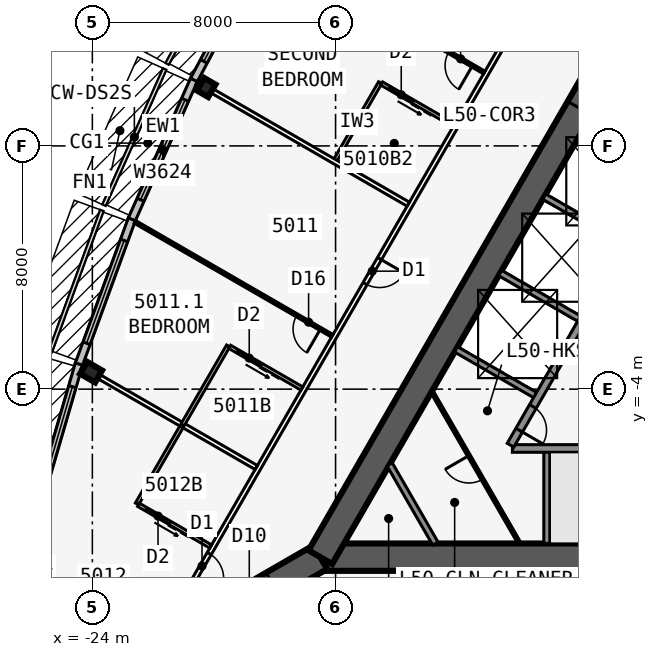
"""IFC4 building model, lengths in metres.
Left out: names, types, materials, properties, quantities, classifications, styles, units other than length and angle.
Written with IfcOpenShell. Run it as: python <this file> out.ifc"""

import sys

from ifc_helpers import new_model, si_unit, direction, frame, frame_2d, origin, origin_2d, place, context, subcontext, project, spatial, rectangle, i_section, extrude, element, fill, save


model = new_model("IFC4")
c1 = context("Model", 3, precision=1e-05, world=origin(), true_north=direction((0.0, 1.0)))
c2 = subcontext(c1, "Body", "Model", "MODEL_VIEW")
j1 = project(units=[si_unit("LENGTHUNIT", "METRE"), si_unit("PLANEANGLEUNIT", "RADIAN")], contexts=[c1])
p1 = place(None, origin())
s1 = spatial("IfcSite", under=j1, at=p1, CompositionType="ELEMENT")
p2 = place(p1, origin())
s2 = spatial("IfcBuilding", under=s1, at=p2, CompositionType="ELEMENT")
p3 = place(p2, frame((0.0, 0.0, 186.1)))
s3 = spatial("IfcBuildingStorey", under=s2, at=p3, CompositionType="ELEMENT", Elevation=186.1)
p4 = place(p3, frame((-16.5, -9.526, 0.0), z_axis=(0.0, 0.0, 1.0), x_axis=(1.0, 0.0, 0.0)))
e1 = element("IfcWall", 1, at=p4, inside=s3, PredefinedType="SHEAR", context=c2, shape_type="SweptSolid", body=[
    extrude(rectangle(XDim=33.0, YDim=0.9, at=frame_2d((16.5, 0.0))), origin(), (0.0, 0.0, 1.0), 3.4),
])
p5 = place(p4, frame((14.05, 0.0, 0.0)))
e2 = element("IfcOpeningElement", 2, at=p5, cuts=e1, PredefinedType="OPENING", context=c2, shape_type="SweptSolid", body=[
    extrude(rectangle(XDim=1.8, YDim=2.13, at=frame_2d((0.9, 1.065))), frame((0.0, 0.46, 0.0), z_axis=(0.0, -1.0, 0.0), x_axis=(1.0, 0.0, 0.0)), (0.0, 0.0, 1.0), 0.92),
])
p6 = place(p3, frame((-10.183, -5.951, 0.0), z_axis=(0.0, 0.0, 1.0), x_axis=(1.0, 0.0, 0.0)))
e3 = element("IfcWall", 3, at=p6, inside=s3, PredefinedType="SOLIDWALL", context=c2, shape_type="SweptSolid", body=[
    extrude(rectangle(XDim=7.633, YDim=0.25, at=frame_2d((3.816, 0.0))), origin(), (0.0, 0.0, 1.0), 3.15),
])
p7 = place(p3, frame((-9.05, -5.951, 0.0), z_axis=(0.0, 0.0, 1.0), x_axis=(0.0, -1.0, 0.0)))
e4 = element("IfcWall", 4, at=p7, inside=s3, PredefinedType="SOLIDWALL", context=c2, shape_type="SweptSolid", body=[
    extrude(rectangle(XDim=3.125, YDim=0.2, at=frame_2d((1.562, 0.0))), origin(), (0.0, 0.0, 1.0), 3.15),
])
p8 = place(p3, frame((0.0, 19.052, 0.0), z_axis=(0.0, 0.0, 1.0), x_axis=(-0.499999749417, -0.866025548458, 0.0)))
e5 = element("IfcWall", 5, at=p8, inside=s3, PredefinedType="SHEAR", context=c2, shape_type="SweptSolid", body=[
    extrude(rectangle(XDim=33.0, YDim=0.9, at=frame_2d((16.5, 0.0))), origin(), (0.0, 0.0, 1.0), 3.4),
])
p9 = place(p8, frame((14.15, 0.0, 0.0)))
e6 = element("IfcOpeningElement", 6, at=p9, cuts=e5, PredefinedType="OPENING", context=c2, shape_type="SweptSolid", body=[
    extrude(rectangle(XDim=1.8, YDim=2.13, at=frame_2d((0.9, 1.065))), frame((0.0, 0.46, 0.0), z_axis=(0.0, -1.0, 0.0), x_axis=(1.0, 0.0, 0.0)), (0.0, 0.0, 1.0), 0.92),
])
p10 = place(p8, frame((12.6, 0.0, 0.0)))
e7 = element("IfcOpeningElement", 7, at=p10, cuts=e5, PredefinedType="OPENING", context=c2, shape_type="SweptSolid", body=[
    extrude(rectangle(XDim=1.0, YDim=2.13, at=frame_2d((0.5, 1.065))), frame((0.0, 0.46, 0.0), z_axis=(0.0, -1.0, 0.0), x_axis=(1.0, 0.0, 0.0)), (0.0, 0.0, 1.0), 0.92),
])
p11 = place(p3, frame((-4.929, 3.365, 0.0), z_axis=(0.0, 0.0, 1.0), x_axis=(-0.499991433582, -0.866030349552, 0.0)))
e8 = element("IfcWall", 8, at=p11, inside=s3, PredefinedType="SOLIDWALL", context=c2, shape_type="SweptSolid", body=[
    extrude(rectangle(XDim=10.633, YDim=0.25, at=frame_2d((5.316, 0.0))), origin(), (0.0, 0.0, 1.0), 3.15),
])
p12 = place(p11, frame((9.164, 0.0, 0.0)))
e9 = element("IfcOpeningElement", 9, at=p12, cuts=e8, PredefinedType="OPENING", context=c2, shape_type="SweptSolid", body=[
    extrude(rectangle(XDim=0.9, YDim=2.13, at=frame_2d((0.45, 1.065))), frame((0.0, 0.135, 0.0), z_axis=(0.0, -1.0, 0.0), x_axis=(1.0, 0.0, 0.0)), (0.0, 0.0, 1.0), 0.27),
])
for number, where, z_axis, x_axis in (
    (10, (-6.429, 0.767, 0.0), (0.0, 0.0, 1.0), (-0.866, 0.5, 0.0)),
    (11, (-7.879, -1.744, 0.0), (0.0, 0.0, 1.0), (-0.866, 0.5, 0.0)),
    (12, (-9.329, -4.256, 0.0), (0.0, 0.0, 1.0), (-0.866, 0.5, 0.0)),
):
    element("IfcWall", number, at=place(p3, frame(where, z_axis=z_axis, x_axis=x_axis)), inside=s3, PredefinedType="SOLIDWALL", context=c2, shape_type="SweptSolid", body=[
        extrude(rectangle(XDim=3.125, YDim=0.2, at=frame_2d((1.562, 0.0))), origin(), (0.0, 0.0, 1.0), 3.15),
    ])
p13 = place(p3, frame((-16.5, -9.526, 0.0), z_axis=(0.0, 0.0, 1.0), x_axis=(-0.866031398331, -0.499989616998, 0.0)))
e13 = element("IfcWall", 13, at=p13, inside=s3, PredefinedType="SHEAR", context=c2, shape_type="SweptSolid", body=[
    extrude(rectangle(XDim=4.746, YDim=0.9, at=frame_2d((2.373, 0.0))), origin(), (0.0, 0.0, 1.0), 3.4),
])
p14 = place(p13, frame((1.8, 0.0, 0.0)))
e14 = element("IfcOpeningElement", 14, at=p14, cuts=e13, PredefinedType="OPENING", context=c2, shape_type="SweptSolid", body=[
    extrude(rectangle(XDim=1.8, YDim=2.13, at=frame_2d((0.9, 1.065))), frame((0.0, 0.46, 0.0), z_axis=(0.0, -1.0, 0.0), x_axis=(1.0, 0.0, 0.0)), (0.0, 0.0, 1.0), 0.92),
])
p15 = place(p3, frame((-20.254, 5.92, 0.0), z_axis=(0.0, 0.0, 1.0), x_axis=(-0.866025403784, 0.5, 0.0)))
e15 = element("IfcColumn", 15, at=p15, inside=s3, PredefinedType="COLUMN", context=c2, shape_type="SweptSolid", body=[
    extrude(i_section(OverallWidth=0.424, OverallDepth=0.475, WebThickness=0.048, FlangeThickness=0.077, at=origin_2d()), origin(), (0.0, 0.0, 1.0), 3.4),
])
p16 = place(p3, frame((-24.041, -3.44, 0.0), z_axis=(0.0, 0.0, 1.0), x_axis=(-0.5, -0.866025403784, 0.0)))
e16 = element("IfcColumn", 16, at=p16, inside=s3, PredefinedType="COLUMN", context=c2, shape_type="SweptSolid", body=[
    extrude(i_section(OverallWidth=0.455, OverallDepth=0.569, WebThickness=0.078, FlangeThickness=0.125, at=origin_2d()), origin(), (0.0, 0.0, 1.0), 3.4),
])
p17 = place(p3, frame((-18.314, 10.579, 0.0), z_axis=(0.0, 0.0, 1.0), x_axis=(-0.469404966864, -0.882982999317, 0.0)))
e17 = element("IfcWall", 17, at=p17, inside=s3, PredefinedType="STANDARD", context=c2, shape_type="SweptSolid", body=[
    extrude(rectangle(XDim=5.003, YDim=0.25, at=frame_2d((2.501, 0.0))), origin(), (0.0, 0.0, 1.0), 3.15),
])
p18 = place(p17, frame((0.701, 0.0, 0.45)))
e18 = element("IfcOpeningElement", 18, at=p18, cuts=e17, PredefinedType="OPENING", context=c2, shape_type="SweptSolid", body=[
    extrude(rectangle(XDim=3.6, YDim=2.4, at=frame_2d((1.8, 1.2))), frame((0.0, 0.135, 0.0), z_axis=(0.0, -1.0, 0.0), x_axis=(1.0, 0.0, 0.0)), (0.0, 0.0, 1.0), 0.27),
])
p19 = place(p3, frame((-20.659, 6.169, 0.0), z_axis=(0.0, 0.0, 1.0), x_axis=(-0.406832200364, -0.913502906808, 0.0)))
e19 = element("IfcWall", 19, at=p19, inside=s3, PredefinedType="STANDARD", context=c2, shape_type="SweptSolid", body=[
    extrude(rectangle(XDim=5.028, YDim=0.25, at=frame_2d((2.514, 0.0))), origin(), (0.0, 0.0, 1.0), 3.15),
])
p20 = place(p19, frame((0.714, 0.0, 0.45)))
e20 = element("IfcOpeningElement", 20, at=p20, cuts=e19, PredefinedType="OPENING", context=c2, shape_type="SweptSolid", body=[
    extrude(rectangle(XDim=3.6, YDim=2.4, at=frame_2d((1.8, 1.2))), frame((0.0, 0.135, 0.0), z_axis=(0.0, -1.0, 0.0), x_axis=(1.0, 0.0, 0.0)), (0.0, 0.0, 1.0), 0.27),
])
p21 = place(p3, frame((-22.701, 1.584, 0.0), z_axis=(0.0, 0.0, 1.0), x_axis=(-0.343225593282, -0.939252996863, 0.0)))
e21 = element("IfcWall", 21, at=p21, inside=s3, PredefinedType="STANDARD", context=c2, shape_type="SweptSolid", body=[
    extrude(rectangle(XDim=5.076, YDim=0.25, at=frame_2d((2.538, 0.0))), origin(), (0.0, 0.0, 1.0), 3.15),
])
p22 = place(p21, frame((0.738, 0.0, 0.45)))
e22 = element("IfcOpeningElement", 22, at=p22, cuts=e21, PredefinedType="OPENING", context=c2, shape_type="SweptSolid", body=[
    extrude(rectangle(XDim=3.6, YDim=2.4, at=frame_2d((1.8, 1.2))), frame((0.0, 0.135, 0.0), z_axis=(0.0, -1.0, 0.0), x_axis=(1.0, 0.0, 0.0)), (0.0, 0.0, 1.0), 0.27),
])
p23 = place(p3, frame((-24.441, -3.175, 0.0), z_axis=(0.0, 0.0, 1.0), x_axis=(-0.279528287117, -0.960137457191, 0.0)))
e23 = element("IfcWall", 23, at=p23, inside=s3, PredefinedType="STANDARD", context=c2, shape_type="SweptSolid", body=[
    extrude(rectangle(XDim=5.148, YDim=0.25, at=frame_2d((2.574, 0.0))), origin(), (0.0, 0.0, 1.0), 3.15),
])
p24 = place(p23, frame((0.774, 0.0, 0.45)))
e24 = element("IfcOpeningElement", 24, at=p24, cuts=e23, PredefinedType="OPENING", context=c2, shape_type="SweptSolid", body=[
    extrude(rectangle(XDim=3.6, YDim=2.4, at=frame_2d((1.8, 1.2))), frame((0.0, 0.135, 0.0), z_axis=(0.0, -1.0, 0.0), x_axis=(1.0, 0.0, 0.0)), (0.0, 0.0, 1.0), 0.27),
])
p25 = place(p3, frame((-0.5, 24.636, 0.0), z_axis=(0.0, 0.0, 1.0), x_axis=(-0.500001915564, -0.86602429783, 0.0)))
e25 = element("IfcWall", 25, at=p25, inside=s3, PredefinedType="PARTITIONING", context=c2, shape_type="SweptSolid", body=[
    extrude(rectangle(XDim=42.172, YDim=0.15, at=frame_2d((21.086, 0.0))), origin(), (0.0, 0.0, 1.0), 3.15),
])
p26 = place(p25, frame((2.338, 0.0, 0.0)))
e26 = element("IfcOpeningElement", 26, at=p26, cuts=e25, PredefinedType="OPENING", context=c2, shape_type="SweptSolid", body=[
    extrude(rectangle(XDim=0.95, YDim=2.13, at=frame_2d((0.475, 1.065))), frame((0.0, 0.085, 0.0), z_axis=(0.0, -1.0, 0.0), x_axis=(1.0, 0.0, 0.0)), (0.0, 0.0, 1.0), 0.17),
])
p27 = place(p25, frame((18.111, 0.0, 0.0)))
e27 = element("IfcOpeningElement", 27, at=p27, cuts=e25, PredefinedType="OPENING", context=c2, shape_type="SweptSolid", body=[
    extrude(rectangle(XDim=0.95, YDim=2.13, at=frame_2d((0.475, 1.065))), frame((0.0, 0.085, 0.0), z_axis=(0.0, -1.0, 0.0), x_axis=(1.0, 0.0, 0.0)), (0.0, 0.0, 1.0), 0.17),
])
p28 = place(p25, frame((28.111, 0.0, 0.0)))
e28 = element("IfcOpeningElement", 28, at=p28, cuts=e25, PredefinedType="OPENING", context=c2, shape_type="SweptSolid", body=[
    extrude(rectangle(XDim=0.95, YDim=2.13, at=frame_2d((0.475, 1.065))), frame((0.0, 0.085, 0.0), z_axis=(0.0, -1.0, 0.0), x_axis=(1.0, 0.0, 0.0)), (0.0, 0.0, 1.0), 0.17),
])
p29 = place(p25, frame((39.311, 0.0, 0.0)))
e29 = element("IfcOpeningElement", 29, at=p29, cuts=e25, PredefinedType="OPENING", context=c2, shape_type="SweptSolid", body=[
    extrude(rectangle(XDim=0.95, YDim=2.13, at=frame_2d((0.475, 1.065))), frame((0.0, 0.085, 0.0), z_axis=(0.0, -1.0, 0.0), x_axis=(1.0, 0.0, 0.0)), (0.0, 0.0, 1.0), 0.17),
])
p30 = place(p3, frame((-11.108, 6.413, 0.0), z_axis=(0.0, 0.0, 1.0), x_axis=(-0.866026407964, 0.499998260706, 0.0)))
e30 = element("IfcWall", 30, at=p30, inside=s3, PredefinedType="PARTITIONING", context=c2, shape_type="SweptSolid", body=[
    extrude(rectangle(XDim=8.199, YDim=0.1, at=frame_2d((4.099, 0.0))), origin(), (0.0, 0.0, 1.0), 2.108),
])
p31 = place(p30, frame((0.45, 0.0, 0.0)))
e31 = element("IfcOpeningElement", 31, at=p31, cuts=e30, PredefinedType="OPENING", context=c2, shape_type="SweptSolid", body=[
    extrude(rectangle(XDim=0.9, YDim=2.032, at=frame_2d((0.45, 1.016))), frame((0.0, 0.06, 0.0), z_axis=(0.0, -1.0, 0.0), x_axis=(1.0, 0.0, 0.0)), (0.0, 0.0, 1.0), 0.12),
])
p32 = place(p3, frame((-13.608, 2.083, 0.0), z_axis=(0.0, 0.0, 1.0), x_axis=(-0.866028486751, 0.499994660107, 0.0)))
e32 = element("IfcWall", 32, at=p32, inside=s3, PredefinedType="PARTITIONING", context=c2, shape_type="SweptSolid", body=[
    extrude(rectangle(XDim=8.022, YDim=0.15, at=frame_2d((4.011, 0.0))), origin(), (0.0, 0.0, 1.0), 2.05),
])
p33 = place(p3, frame((-16.108, -2.247, 0.0), z_axis=(0.0, 0.0, 1.0), x_axis=(-0.866025567496, 0.499999716443, 0.0)))
e33 = element("IfcWall", 33, at=p33, inside=s3, PredefinedType="PARTITIONING", context=c2, shape_type="SweptSolid", body=[
    extrude(rectangle(XDim=7.495, YDim=0.1, at=frame_2d((3.748, 0.0))), origin(), (0.0, 0.0, 1.0), 2.108),
])
p34 = place(p33, frame((0.45, 0.0, 0.0)))
e34 = element("IfcOpeningElement", 34, at=p34, cuts=e33, PredefinedType="OPENING", context=c2, shape_type="SweptSolid", body=[
    extrude(rectangle(XDim=0.9, YDim=2.032, at=frame_2d((0.45, 1.016))), frame((0.0, 0.06, 0.0), z_axis=(0.0, -1.0, 0.0), x_axis=(1.0, 0.0, 0.0)), (0.0, 0.0, 1.0), 0.12),
])
p35 = place(p3, frame((-18.608, -6.577, 0.0), z_axis=(0.0, 0.0, 1.0), x_axis=(-0.866031967744, 0.499988630717, 0.0)))
e35 = element("IfcWall", 35, at=p35, inside=s3, PredefinedType="PARTITIONING", context=c2, shape_type="SweptSolid", body=[
    extrude(rectangle(XDim=6.616, YDim=0.15, at=frame_2d((3.308, 0.0))), origin(), (0.0, 0.0, 1.0), 2.05),
])
p36 = place(p3, frame((-14.533, 6.081, 0.0), z_axis=(0.0, 0.0, 1.0), x_axis=(-0.499990139034, -0.866031096941, 0.0)))
e36 = element("IfcWall", 36, at=p36, inside=s3, PredefinedType="PLUMBINGWALL", context=c2, shape_type="SweptSolid", body=[
    extrude(rectangle(XDim=3.0, YDim=0.12, at=frame_2d((1.5, 0.0))), origin(), (0.0, 0.0, 1.0), 3.15),
])
p37 = place(p3, frame((-12.108, 4.681, 0.0), z_axis=(0.0, 0.0, 1.0), x_axis=(-0.866035715982, 0.499982138324, 0.0)))
e37 = element("IfcWall", 37, at=p37, inside=s3, PredefinedType="PLUMBINGWALL", context=c2, shape_type="SweptSolid", body=[
    extrude(rectangle(XDim=2.74, YDim=0.12, at=frame_2d((1.37, 0.0))), origin(), (0.0, 0.0, 1.0), 3.15),
])
p38 = place(p37, frame((1.55, 0.0, 0.0)))
e38 = element("IfcOpeningElement", 38, at=p38, cuts=e37, PredefinedType="OPENING", context=c2, shape_type="SweptSolid", body=[
    extrude(rectangle(XDim=0.9, YDim=2.13, at=frame_2d((0.45, 1.065))), frame((0.0, 0.07, 0.0), z_axis=(0.0, -1.0, 0.0), x_axis=(1.0, 0.0, 0.0)), (0.0, 0.0, 1.0), 0.14),
])
p39 = place(p3, frame((-19.533, -2.579, 0.0), z_axis=(0.0, 0.0, 1.0), x_axis=(-0.499990139034, -0.866031096941, 0.0)))
e39 = element("IfcWall", 39, at=p39, inside=s3, PredefinedType="PLUMBINGWALL", context=c2, shape_type="SweptSolid", body=[
    extrude(rectangle(XDim=3.0, YDim=0.12, at=frame_2d((1.5, 0.0))), origin(), (0.0, 0.0, 1.0), 3.15),
])
p40 = place(p3, frame((-17.108, -3.979, 0.0), z_axis=(0.0, 0.0, 1.0), x_axis=(-0.865997131366, 0.500048966069, 0.0)))
e40 = element("IfcWall", 40, at=p40, inside=s3, PredefinedType="PLUMBINGWALL", context=c2, shape_type="SweptSolid", body=[
    extrude(rectangle(XDim=2.74, YDim=0.12, at=frame_2d((1.37, 0.0))), origin(), (0.0, 0.0, 1.0), 3.15),
])
p41 = place(p40, frame((1.55, 0.0, 0.0)))
e41 = element("IfcOpeningElement", 41, at=p41, cuts=e40, PredefinedType="OPENING", context=c2, shape_type="SweptSolid", body=[
    extrude(rectangle(XDim=0.9, YDim=2.13, at=frame_2d((0.45, 1.065))), frame((0.0, 0.07, 0.0), z_axis=(0.0, -1.0, 0.0), x_axis=(1.0, 0.0, 0.0)), (0.0, 0.0, 1.0), 0.14),
])
p42 = place(p3, frame((-21.033, -5.177, 0.0), z_axis=(0.0, 0.0, 1.0), x_axis=(-0.499990139034, -0.866031096941, 0.0)))
e42 = element("IfcWall", 42, at=p42, inside=s3, PredefinedType="PLUMBINGWALL", context=c2, shape_type="SweptSolid", body=[
    extrude(rectangle(XDim=3.0, YDim=0.12, at=frame_2d((1.5, 0.0))), origin(), (0.0, 0.0, 1.0), 3.15),
])
p43 = place(p3, frame((-20.108, -9.175, 0.0), z_axis=(0.0, 0.0, 1.0), x_axis=(-0.866035715982, 0.499982138324, 0.0)))
e43 = element("IfcWall", 43, at=p43, inside=s3, PredefinedType="PLUMBINGWALL", context=c2, shape_type="SweptSolid", body=[
    extrude(rectangle(XDim=2.74, YDim=0.12, at=frame_2d((1.37, 0.0))), origin(), (0.0, 0.0, 1.0), 3.15),
])
p44 = place(p43, frame((1.55, 0.0, 0.0)))
e44 = element("IfcOpeningElement", 44, at=p44, cuts=e43, PredefinedType="OPENING", context=c2, shape_type="SweptSolid", body=[
    extrude(rectangle(XDim=0.9, YDim=2.13, at=frame_2d((0.45, 1.065))), frame((0.0, 0.07, 0.0), z_axis=(0.0, -1.0, 0.0), x_axis=(1.0, 0.0, 0.0)), (0.0, 0.0, 1.0), 0.14),
])
p45 = place(p3, frame((-12.719, -9.076, 0.0), z_axis=(0.0, 0.0, 1.0), x_axis=(-0.499952404951, 0.866052881055, 0.0)))
e45 = element("IfcWall", 45, at=p45, inside=s3, PredefinedType="SOLIDWALL", context=c2, shape_type="SweptSolid", body=[
    extrude(rectangle(XDim=3.002, YDim=0.2, at=frame_2d((1.501, 0.0))), origin(), (0.0, 0.0, 1.0), 3.15),
])
p46 = place(p3, frame((-9.947, -9.076, 0.0), z_axis=(0.0, 0.0, 1.0), x_axis=(-0.500027479704, 0.866009537788, 0.0)))
e46 = element("IfcWall", 46, at=p46, inside=s3, PredefinedType="PARTITIONING", context=c2, shape_type="SweptSolid", body=[
    extrude(rectangle(XDim=5.774, YDim=0.1, at=frame_2d((2.887, 0.0))), origin(), (0.0, 0.0, 1.0), 3.15),
])
p47 = place(p46, frame((2.437, 0.0, 0.0)))
e47 = element("IfcOpeningElement", 47, at=p47, cuts=e46, PredefinedType="OPENING", context=c2, shape_type="SweptSolid", body=[
    extrude(rectangle(XDim=0.9, YDim=2.13, at=frame_2d((0.45, 1.065))), frame((0.0, 0.06, 0.0), z_axis=(0.0, -1.0, 0.0), x_axis=(1.0, 0.0, 0.0)), (0.0, 0.0, 1.0), 0.12),
])
p48 = place(p18, origin())
e48 = element("IfcWindow", 48, at=p48, inside=s3, PartitioningType="SINGLE_PANEL", PredefinedType="WINDOW", context=c2, shape_type="SweptSolid", body=[
    extrude(rectangle(XDim=3.6, YDim=2.4, at=frame_2d((1.8, 1.2))), frame((0.0, 0.03, 0.0), z_axis=(0.0, -1.0, 0.0), x_axis=(1.0, 0.0, 0.0)), (0.0, 0.0, 1.0), 0.06),
])
fill(e18, e48)
p49 = place(p20, origin())
e49 = element("IfcWindow", 49, at=p49, inside=s3, PartitioningType="SINGLE_PANEL", PredefinedType="WINDOW", context=c2, shape_type="SweptSolid", body=[
    extrude(rectangle(XDim=3.6, YDim=2.4, at=frame_2d((1.8, 1.2))), frame((0.0, 0.03, 0.0), z_axis=(0.0, -1.0, 0.0), x_axis=(1.0, 0.0, 0.0)), (0.0, 0.0, 1.0), 0.06),
])
fill(e20, e49)
p50 = place(p22, origin())
e50 = element("IfcWindow", 50, at=p50, inside=s3, PartitioningType="SINGLE_PANEL", PredefinedType="WINDOW", context=c2, shape_type="SweptSolid", body=[
    extrude(rectangle(XDim=3.6, YDim=2.4, at=frame_2d((1.8, 1.2))), frame((0.0, 0.03, 0.0), z_axis=(0.0, -1.0, 0.0), x_axis=(1.0, 0.0, 0.0)), (0.0, 0.0, 1.0), 0.06),
])
fill(e22, e50)
p51 = place(p24, origin())
e51 = element("IfcWindow", 51, at=p51, inside=s3, PartitioningType="SINGLE_PANEL", PredefinedType="WINDOW", context=c2, shape_type="SweptSolid", body=[
    extrude(rectangle(XDim=3.6, YDim=2.4, at=frame_2d((1.8, 1.2))), frame((0.0, 0.03, 0.0), z_axis=(0.0, -1.0, 0.0), x_axis=(1.0, 0.0, 0.0)), (0.0, 0.0, 1.0), 0.06),
])
fill(e24, e51)
p52 = place(p31, origin())
e52 = element("IfcDoor", 52, at=p52, inside=s3, OperationType="SINGLE_SWING_LEFT", PredefinedType="DOOR", context=c2, shape_type="SweptSolid", body=[
    extrude(rectangle(XDim=0.9, YDim=2.032, at=frame_2d((0.45, 1.016))), frame((0.0, 0.025, 0.0), z_axis=(0.0, -1.0, 0.0), x_axis=(1.0, 0.0, 0.0)), (0.0, 0.0, 1.0), 0.05),
])
fill(e31, e52)
p53 = place(p34, origin())
e53 = element("IfcDoor", 53, at=p53, inside=s3, OperationType="SINGLE_SWING_LEFT", PredefinedType="DOOR", context=c2, shape_type="SweptSolid", body=[
    extrude(rectangle(XDim=0.9, YDim=2.032, at=frame_2d((0.45, 1.016))), frame((0.0, 0.025, 0.0), z_axis=(0.0, -1.0, 0.0), x_axis=(1.0, 0.0, 0.0)), (0.0, 0.0, 1.0), 0.05),
])
fill(e34, e53)
p54 = place(p38, origin())
e54 = element("IfcDoor", 54, at=p54, inside=s3, OperationType="SLIDING_TO_LEFT", PredefinedType="DOOR", context=c2, shape_type="SweptSolid", body=[
    extrude(rectangle(XDim=0.9, YDim=2.13, at=frame_2d((0.45, 1.065))), frame((0.0, 0.025, 0.0), z_axis=(0.0, -1.0, 0.0), x_axis=(1.0, 0.0, 0.0)), (0.0, 0.0, 1.0), 0.05),
])
fill(e38, e54)
p55 = place(p28, origin())
e55 = element("IfcDoor", 55, at=p55, inside=s3, OperationType="SINGLE_SWING_LEFT", PredefinedType="DOOR", context=c2, shape_type="SweptSolid", body=[
    extrude(rectangle(XDim=0.95, YDim=2.13, at=frame_2d((0.475, 1.065))), frame((0.0, 0.025, 0.0), z_axis=(0.0, -1.0, 0.0), x_axis=(1.0, 0.0, 0.0)), (0.0, 0.0, 1.0), 0.05),
])
fill(e28, e55)
p56 = place(p41, origin())
e56 = element("IfcDoor", 56, at=p56, inside=s3, OperationType="SLIDING_TO_LEFT", PredefinedType="DOOR", context=c2, shape_type="SweptSolid", body=[
    extrude(rectangle(XDim=0.9, YDim=2.13, at=frame_2d((0.45, 1.065))), frame((0.0, 0.025, 0.0), z_axis=(0.0, -1.0, 0.0), x_axis=(1.0, 0.0, 0.0)), (0.0, 0.0, 1.0), 0.05),
])
fill(e41, e56)
p57 = place(p44, origin())
e57 = element("IfcDoor", 57, at=p57, inside=s3, OperationType="SLIDING_TO_LEFT", PredefinedType="DOOR", context=c2, shape_type="SweptSolid", body=[
    extrude(rectangle(XDim=0.9, YDim=2.13, at=frame_2d((0.45, 1.065))), frame((0.0, 0.025, 0.0), z_axis=(0.0, -1.0, 0.0), x_axis=(1.0, 0.0, 0.0)), (0.0, 0.0, 1.0), 0.05),
])
fill(e44, e57)
p58 = place(p29, origin())
e58 = element("IfcDoor", 58, at=p58, inside=s3, OperationType="SINGLE_SWING_RIGHT", PredefinedType="DOOR", context=c2, shape_type="SweptSolid", body=[
    extrude(rectangle(XDim=0.95, YDim=2.13, at=frame_2d((0.475, 1.065))), frame((0.0, 0.025, 0.0), z_axis=(0.0, -1.0, 0.0), x_axis=(1.0, 0.0, 0.0)), (0.0, 0.0, 1.0), 0.05),
])
fill(e29, e58)
p59 = place(p47, origin())
e59 = element("IfcDoor", 59, at=p59, inside=s3, OperationType="SINGLE_SWING_RIGHT", PredefinedType="DOOR", context=c2, shape_type="SweptSolid", body=[
    extrude(rectangle(XDim=0.9, YDim=2.13, at=frame_2d((0.45, 1.065))), frame((0.0, 0.025, 0.0), z_axis=(0.0, -1.0, 0.0), x_axis=(1.0, 0.0, 0.0)), (0.0, 0.0, 1.0), 0.05),
])
fill(e47, e59)
p60 = place(p12, origin())
e60 = element("IfcDoor", 60, at=p60, inside=s3, OperationType="SINGLE_SWING_RIGHT", PredefinedType="DOOR", context=c2, shape_type="SweptSolid", body=[
    extrude(rectangle(XDim=0.9, YDim=2.13, at=frame_2d((0.45, 1.065))), frame((0.0, 0.025, 0.0), z_axis=(0.0, -1.0, 0.0), x_axis=(1.0, 0.0, 0.0)), (0.0, 0.0, 1.0), 0.05),
])
fill(e9, e60)
save(model, sys.argv[1])
